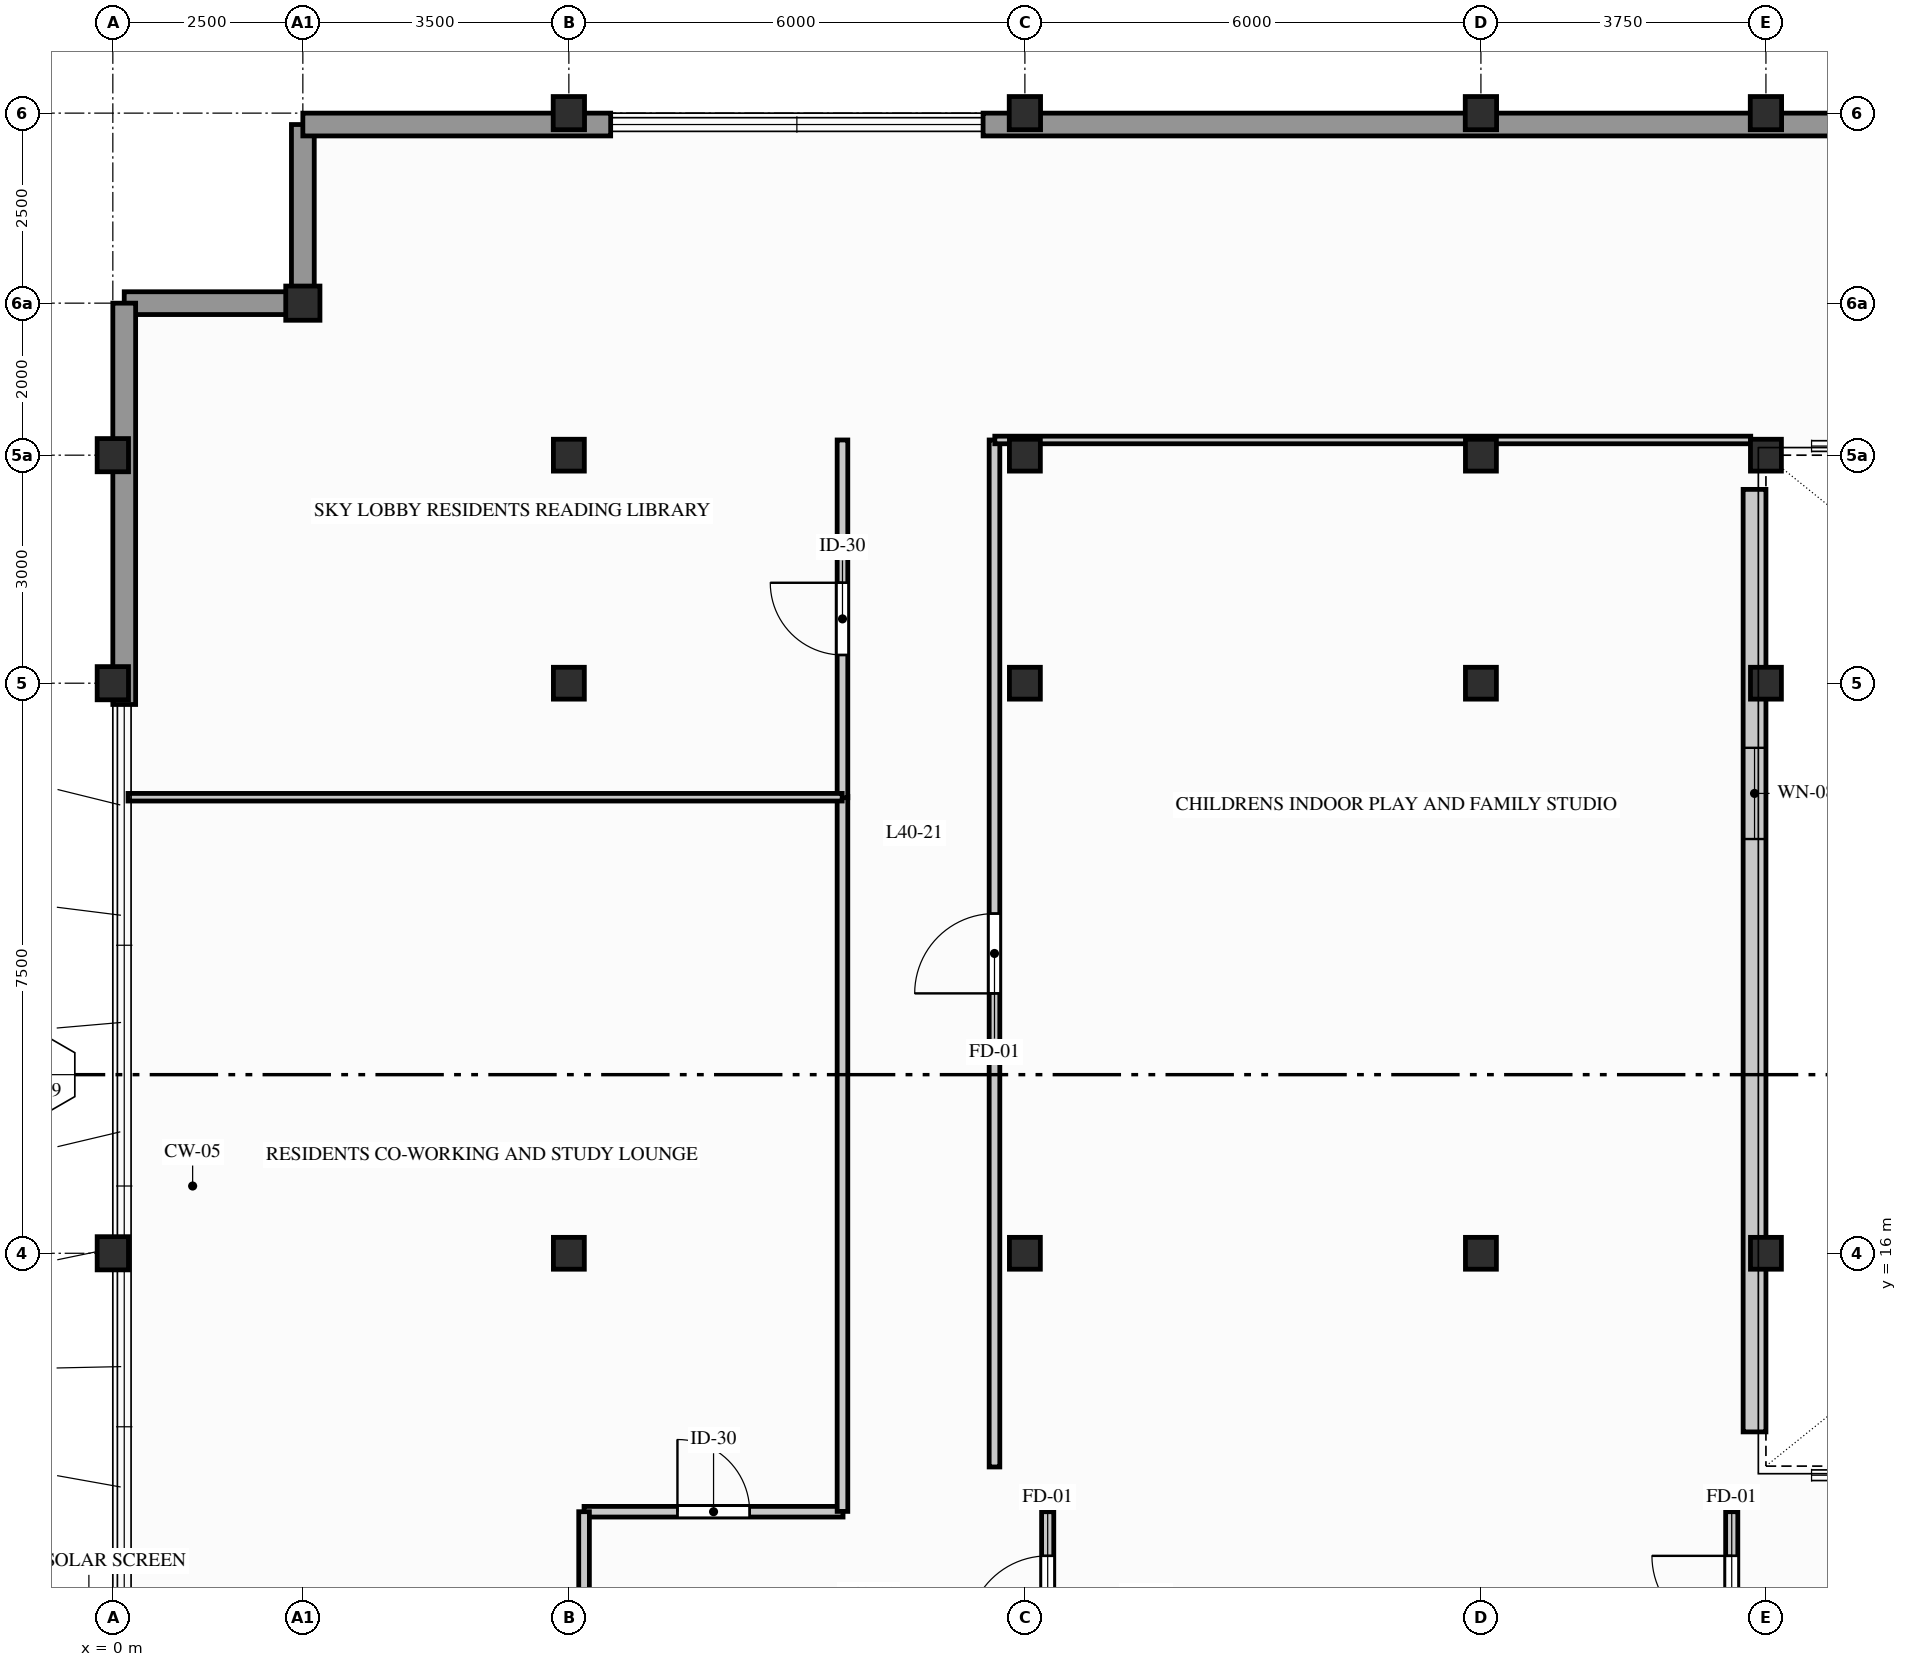
"""IFC4 building model, lengths in metres.
Left out: names, types, materials, properties, quantities, classifications, styles, units other than length and angle.
Written with IfcOpenShell. Run it as: python <this file> out.ifc"""

import sys

from ifc_helpers import new_model, si_unit, direction, frame, frame_2d, origin, origin_2d, place, context, subcontext, project, spatial, rectangle, hollow_rectangle, i_section, extrude, element, fill, save


model = new_model("IFC4")
c1 = context("Model", 3, precision=1e-05, world=origin(), true_north=direction((0.0, 1.0)))
c2 = subcontext(c1, "Body", "Model", "MODEL_VIEW")
j1 = project(units=[si_unit("LENGTHUNIT", "METRE"), si_unit("PLANEANGLEUNIT", "RADIAN")], contexts=[c1])
p1 = place(None, origin())
s1 = spatial("IfcSite", under=j1, at=p1, CompositionType="ELEMENT")
p2 = place(p1, origin())
s2 = spatial("IfcBuilding", under=s1, at=p2, CompositionType="ELEMENT")
p3 = place(p2, frame((0.0, 0.0, 134.5)))
s3 = spatial("IfcBuildingStorey", under=s2, at=p3, CompositionType="ELEMENT", Elevation=134.5)
for number, where, z_axis, x_axis in (
    (1, (0.0, 16.0, 0.0), (0.0, 0.0, 1.0), (1.0, 0.0, 0.0)),
    (2, (0.0, 23.5, 0.0), (0.0, 0.0, 1.0), (1.0, 0.0, 0.0)),
    (3, (0.0, 26.5, 0.0), (0.0, 0.0, 1.0), (1.0, 0.0, 0.0)),
):
    element("IfcColumn", number, at=place(p3, frame(where, z_axis=z_axis, x_axis=x_axis)), inside=s3, PredefinedType="COLUMN", context=c2, shape_type="SweptSolid", body=[
        extrude(i_section(OverallWidth=0.412, OverallDepth=0.437, WebThickness=0.036, FlangeThickness=0.058, FilletRadius=0.015, at=origin_2d()), origin(), (0.0, 0.0, 1.0), 4.2),
    ])
p4 = place(p3, frame((2.5, 28.5, 0.0), z_axis=(0.0, 0.0, 1.0), x_axis=(1.0, 0.0, 0.0)))
e4 = element("IfcColumn", 4, at=p4, inside=s3, PredefinedType="COLUMN", context=c2, shape_type="SweptSolid", body=[
    extrude(hollow_rectangle(XDim=0.45, YDim=0.45, WallThickness=0.025, InnerFilletRadius=0.012, OuterFilletRadius=0.024, at=origin_2d()), origin(), (0.0, 0.0, 1.0), 4.2),
])
for number, where, z_axis, x_axis in (
    (5, (6.0, 16.0, 0.0), (0.0, 0.0, 1.0), (1.0, 0.0, 0.0)),
    (6, (6.0, 23.5, 0.0), (0.0, 0.0, 1.0), (1.0, 0.0, 0.0)),
    (7, (6.0, 26.5, 0.0), (0.0, 0.0, 1.0), (1.0, 0.0, 0.0)),
):
    element("IfcColumn", number, at=place(p3, frame(where, z_axis=z_axis, x_axis=x_axis)), inside=s3, PredefinedType="COLUMN", context=c2, shape_type="SweptSolid", body=[
        extrude(i_section(OverallWidth=0.407, OverallDepth=0.419, WebThickness=0.031, FlangeThickness=0.049, FilletRadius=0.015, at=origin_2d()), origin(), (0.0, 0.0, 1.0), 4.2),
    ])
p5 = place(p3, frame((6.0, 31.0, 0.0), z_axis=(0.0, 0.0, 1.0), x_axis=(1.0, 0.0, 0.0)))
e8 = element("IfcColumn", 8, at=p5, inside=s3, PredefinedType="COLUMN", context=c2, shape_type="SweptSolid", body=[
    extrude(i_section(OverallWidth=0.412, OverallDepth=0.437, WebThickness=0.036, FlangeThickness=0.058, FilletRadius=0.015, at=origin_2d()), origin(), (0.0, 0.0, 1.0), 4.2),
])
for number, where, z_axis, x_axis in (
    (9, (12.0, 16.0, 0.0), (0.0, 0.0, 1.0), (1.0, 0.0, 0.0)),
    (10, (12.0, 23.5, 0.0), (0.0, 0.0, 1.0), (1.0, 0.0, 0.0)),
    (11, (12.0, 26.5, 0.0), (0.0, 0.0, 1.0), (1.0, 0.0, 0.0)),
):
    element("IfcColumn", number, at=place(p3, frame(where, z_axis=z_axis, x_axis=x_axis)), inside=s3, PredefinedType="COLUMN", context=c2, shape_type="SweptSolid", body=[
        extrude(i_section(OverallWidth=0.407, OverallDepth=0.419, WebThickness=0.031, FlangeThickness=0.049, FilletRadius=0.015, at=origin_2d()), origin(), (0.0, 0.0, 1.0), 4.2),
    ])
p6 = place(p3, frame((12.0, 31.0, 0.0), z_axis=(0.0, 0.0, 1.0), x_axis=(1.0, 0.0, 0.0)))
e12 = element("IfcColumn", 12, at=p6, inside=s3, PredefinedType="COLUMN", context=c2, shape_type="SweptSolid", body=[
    extrude(i_section(OverallWidth=0.412, OverallDepth=0.437, WebThickness=0.036, FlangeThickness=0.058, FilletRadius=0.015, at=origin_2d()), origin(), (0.0, 0.0, 1.0), 4.2),
])
for number, where, z_axis, x_axis in (
    (13, (18.0, 16.0, 0.0), (0.0, 0.0, 1.0), (1.0, 0.0, 0.0)),
    (14, (18.0, 23.5, 0.0), (0.0, 0.0, 1.0), (1.0, 0.0, 0.0)),
    (15, (18.0, 26.5, 0.0), (0.0, 0.0, 1.0), (1.0, 0.0, 0.0)),
):
    element("IfcColumn", number, at=place(p3, frame(where, z_axis=z_axis, x_axis=x_axis)), inside=s3, PredefinedType="COLUMN", context=c2, shape_type="SweptSolid", body=[
        extrude(i_section(OverallWidth=0.407, OverallDepth=0.419, WebThickness=0.031, FlangeThickness=0.049, FilletRadius=0.015, at=origin_2d()), origin(), (0.0, 0.0, 1.0), 4.2),
    ])
p7 = place(p3, frame((18.0, 31.0, 0.0), z_axis=(0.0, 0.0, 1.0), x_axis=(1.0, 0.0, 0.0)))
e16 = element("IfcColumn", 16, at=p7, inside=s3, PredefinedType="COLUMN", context=c2, shape_type="SweptSolid", body=[
    extrude(i_section(OverallWidth=0.412, OverallDepth=0.437, WebThickness=0.036, FlangeThickness=0.058, FilletRadius=0.015, at=origin_2d()), origin(), (0.0, 0.0, 1.0), 4.2),
])
for number, where, z_axis, x_axis in (
    (17, (21.75, 16.0, 0.0), (0.0, 0.0, 1.0), (1.0, 0.0, 0.0)),
    (18, (21.75, 23.5, 0.0), (0.0, 0.0, 1.0), (1.0, 0.0, 0.0)),
    (19, (21.75, 26.5, 0.0), (0.0, 0.0, 1.0), (1.0, 0.0, 0.0)),
):
    element("IfcColumn", number, at=place(p3, frame(where, z_axis=z_axis, x_axis=x_axis)), inside=s3, PredefinedType="COLUMN", context=c2, shape_type="SweptSolid", body=[
        extrude(i_section(OverallWidth=0.407, OverallDepth=0.419, WebThickness=0.031, FlangeThickness=0.049, FilletRadius=0.015, at=origin_2d()), origin(), (0.0, 0.0, 1.0), 4.2),
    ])
p8 = place(p3, frame((21.75, 31.0, 0.0), z_axis=(0.0, 0.0, 1.0), x_axis=(1.0, 0.0, 0.0)))
e20 = element("IfcColumn", 20, at=p8, inside=s3, PredefinedType="COLUMN", context=c2, shape_type="SweptSolid", body=[
    extrude(i_section(OverallWidth=0.412, OverallDepth=0.437, WebThickness=0.036, FlangeThickness=0.058, FilletRadius=0.015, at=origin_2d()), origin(), (0.0, 0.0, 1.0), 4.2),
])
for number, where, z_axis, x_axis in (
    (21, (2.5, 30.85, 0.0), (0.0, 0.0, 1.0), (0.0, -1.0, 0.0)),
    (22, (2.5, 28.5, 0.0), (0.0, 0.0, 1.0), (-1.0, 0.0, 0.0)),
):
    element("IfcWall", number, at=place(p3, frame(where, z_axis=z_axis, x_axis=x_axis)), inside=s3, PredefinedType="STANDARD", context=c2, shape_type="SweptSolid", body=[
        extrude(rectangle(XDim=2.35, YDim=0.3, at=frame_2d((1.175, 0.0))), origin(), (0.0, 0.0, 1.0), 3.98),
    ])
p9 = place(p3, frame((0.15, 28.5, 0.0), z_axis=(0.0, 0.0, 1.0), x_axis=(0.0, -1.0, 0.0)))
e23 = element("IfcWall", 23, at=p9, inside=s3, PredefinedType="STANDARD", context=c2, shape_type="SweptSolid", body=[
    extrude(rectangle(XDim=5.28, YDim=0.3, at=frame_2d((2.64, 0.0))), origin(), (0.0, 0.0, 1.0), 3.422),
])
p10 = place(p3, frame((2.5, 30.85, 0.0), z_axis=(0.0, 0.0, 1.0), x_axis=(1.0, 0.0, 0.0)))
e24 = element("IfcWall", 24, at=p10, inside=s3, PredefinedType="STANDARD", context=c2, shape_type="SweptSolid", body=[
    extrude(rectangle(XDim=4.05, YDim=0.3, at=frame_2d((2.025, 0.0))), origin(), (0.0, 0.0, 1.0), 3.98),
])
p11 = place(p3, frame((11.45, 30.85, 0.0), z_axis=(0.0, 0.0, 1.0), x_axis=(1.0, 0.0, 0.0)))
e25 = element("IfcWall", 25, at=p11, inside=s3, PredefinedType="STANDARD", context=c2, shape_type="SweptSolid", body=[
    extrude(rectangle(XDim=16.35, YDim=0.3, at=frame_2d((8.175, 0.0))), origin(), (0.0, 0.0, 1.0), 3.422),
])
p12 = place(p3, frame((21.6, 26.05, 0.0), z_axis=(0.0, 0.0, 1.0), x_axis=(0.0, -1.0, 0.0)))
e26 = element("IfcWall", 26, at=p12, inside=s3, PredefinedType="STANDARD", context=c2, shape_type="SweptSolid", body=[
    extrude(rectangle(XDim=12.4, YDim=0.3, at=frame_2d((6.2, 0.0))), origin(), (0.0, 0.0, 1.0), 3.343),
])
p13 = place(p12, frame((3.4, 0.0, 0.5)))
e27 = element("IfcOpeningElement", 27, at=p13, cuts=e26, PredefinedType="OPENING", context=c2, shape_type="SweptSolid", body=[
    extrude(rectangle(XDim=1.2, YDim=1.6, at=frame_2d((0.6, 0.8))), frame((0.0, 0.16, 0.0), z_axis=(0.0, -1.0, 0.0), x_axis=(1.0, 0.0, 0.0)), (0.0, 0.0, 1.0), 0.32),
])
p14 = place(p3, frame((12.3, 10.389, 0.0), z_axis=(0.0, 0.0, 1.0), x_axis=(0.0, 1.0, 0.0)))
e28 = element("IfcWall", 28, at=p14, inside=s3, PredefinedType="PARTITIONING", context=c2, shape_type="SweptSolid", body=[
    extrude(rectangle(XDim=2.211, YDim=0.16, at=frame_2d((1.106, 0.0))), origin(), (0.0, 0.0, 1.0), 3.98),
])
p15 = place(p14, frame((0.581, 0.0, 0.0)))
e29 = element("IfcOpeningElement", 29, at=p15, cuts=e28, PredefinedType="OPENING", context=c2, shape_type="SweptSolid", body=[
    extrude(rectangle(XDim=1.05, YDim=2.06, at=frame_2d((0.525, 1.03))), frame((0.0, 0.09, 0.0), z_axis=(0.0, -1.0, 0.0), x_axis=(1.0, 0.0, 0.0)), (0.0, 0.0, 1.0), 0.18),
])
p16 = place(p3, frame((21.3, 10.389, 0.0), z_axis=(0.0, 0.0, 1.0), x_axis=(0.0, 1.0, 0.0)))
e30 = element("IfcWall", 30, at=p16, inside=s3, PredefinedType="PARTITIONING", context=c2, shape_type="SweptSolid", body=[
    extrude(rectangle(XDim=2.211, YDim=0.16, at=frame_2d((1.106, 0.0))), origin(), (0.0, 0.0, 1.0), 3.98),
])
p17 = place(p16, frame((0.581, 0.0, 0.0)))
e31 = element("IfcOpeningElement", 31, at=p17, cuts=e30, PredefinedType="OPENING", context=c2, shape_type="SweptSolid", body=[
    extrude(rectangle(XDim=1.05, YDim=2.06, at=frame_2d((0.525, 1.03))), frame((0.0, 0.09, 0.0), z_axis=(0.0, -1.0, 0.0), x_axis=(1.0, 0.0, 0.0)), (0.0, 0.0, 1.0), 0.18),
])
p18 = place(p3, frame((6.2, 12.6, 0.0), z_axis=(0.0, 0.0, 1.0), x_axis=(1.0, 0.0, 0.0)))
e32 = element("IfcWall", 32, at=p18, inside=s3, PredefinedType="PARTITIONING", context=c2, shape_type="SweptSolid", body=[
    extrude(rectangle(XDim=3.407, YDim=0.14, at=frame_2d((1.704, 0.0))), origin(), (0.0, 0.0, 1.0), 3.98),
])
p19 = place(p18, frame((1.229, 0.0, 0.0)))
e33 = element("IfcOpeningElement", 33, at=p19, cuts=e32, PredefinedType="OPENING", context=c2, shape_type="SweptSolid", body=[
    extrude(rectangle(XDim=0.95, YDim=2.05, at=frame_2d((0.475, 1.025))), frame((0.0, 0.08, 0.0), z_axis=(0.0, -1.0, 0.0), x_axis=(1.0, 0.0, 0.0)), (0.0, 0.0, 1.0), 0.16),
])
p20 = place(p3, frame((6.2, 10.4, 0.0), z_axis=(0.0, 0.0, 1.0), x_axis=(0.0, 1.0, 0.0)))
e34 = element("IfcWall", 34, at=p20, inside=s3, PredefinedType="PARTITIONING", context=c2, shape_type="SweptSolid", body=[
    extrude(rectangle(XDim=2.2, YDim=0.14, at=frame_2d((1.1, 0.0))), origin(), (0.0, 0.0, 1.0), 3.343),
])
p21 = place(p3, frame((9.6, 12.604, 0.0), z_axis=(0.0, 0.0, 1.0), x_axis=(0.0, 1.0, 0.0)))
e35 = element("IfcWall", 35, at=p21, inside=s3, PredefinedType="PARTITIONING", context=c2, shape_type="SweptSolid", body=[
    extrude(rectangle(XDim=9.407, YDim=0.14, at=frame_2d((4.704, 0.0))), origin(), (0.0, 0.0, 1.0), 3.343),
])
p22 = place(p3, frame((9.6, 21.993, 0.0), z_axis=(0.0, 0.0, 1.0), x_axis=(0.0, 1.0, 0.0)))
e36 = element("IfcWall", 36, at=p22, inside=s3, PredefinedType="PARTITIONING", context=c2, shape_type="SweptSolid", body=[
    extrude(rectangle(XDim=4.707, YDim=0.14, at=frame_2d((2.354, 0.0))), origin(), (0.0, 0.0, 1.0), 3.343),
])
p23 = place(p22, frame((1.879, 0.0, 0.0)))
e37 = element("IfcOpeningElement", 37, at=p23, cuts=e36, PredefinedType="OPENING", context=c2, shape_type="SweptSolid", body=[
    extrude(rectangle(XDim=0.95, YDim=2.05, at=frame_2d((0.475, 1.025))), frame((0.0, 0.08, 0.0), z_axis=(0.0, -1.0, 0.0), x_axis=(1.0, 0.0, 0.0)), (0.0, 0.0, 1.0), 0.16),
])
p24 = place(p3, frame((11.6, 13.189, 0.0), z_axis=(0.0, 0.0, 1.0), x_axis=(0.0, 1.0, 0.0)))
e38 = element("IfcWall", 38, at=p24, inside=s3, PredefinedType="PARTITIONING", context=c2, shape_type="SweptSolid", body=[
    extrude(rectangle(XDim=13.511, YDim=0.14, at=frame_2d((6.756, 0.0))), origin(), (0.0, 0.0, 1.0), 3.343),
])
p25 = place(p24, frame((6.231, 0.0, 0.0)))
e39 = element("IfcOpeningElement", 39, at=p25, cuts=e38, PredefinedType="OPENING", context=c2, shape_type="SweptSolid", body=[
    extrude(rectangle(XDim=1.05, YDim=2.06, at=frame_2d((0.525, 1.03))), frame((0.0, 0.08, 0.0), z_axis=(0.0, -1.0, 0.0), x_axis=(1.0, 0.0, 0.0)), (0.0, 0.0, 1.0), 0.16),
])
p26 = place(p3, frame((0.2, 22.0, 0.0), z_axis=(0.0, 0.0, 1.0), x_axis=(1.0, 0.0, 0.0)))
e40 = element("IfcWall", 40, at=p26, inside=s3, PredefinedType="PARTITIONING", context=c2, shape_type="SweptSolid", body=[
    extrude(rectangle(XDim=9.396, YDim=0.1, at=frame_2d((4.698, 0.0))), origin(), (0.0, 0.0, 1.0), 3.343),
])
p27 = place(p3, frame((11.604, 26.7, 0.0), z_axis=(0.0, 0.0, 1.0), x_axis=(1.0, 0.0, 0.0)))
e41 = element("IfcWall", 41, at=p27, inside=s3, PredefinedType="PARTITIONING", context=c2, shape_type="SweptSolid", body=[
    extrude(rectangle(XDim=9.946, YDim=0.1, at=frame_2d((4.973, 0.0))), origin(), (0.0, 0.0, 1.0), 3.343),
])
p28 = place(p13, origin())
e42 = element("IfcWindow", 42, at=p28, inside=s3, PartitioningType="SINGLE_PANEL", PredefinedType="WINDOW", context=c2, shape_type="SweptSolid", body=[
    extrude(rectangle(XDim=1.2, YDim=1.6, at=frame_2d((0.6, 0.8))), frame((0.0, 0.03, 0.0), z_axis=(0.0, -1.0, 0.0), x_axis=(1.0, 0.0, 0.0)), (0.0, 0.0, 1.0), 0.06),
])
fill(e27, e42)
p29 = place(p15, origin())
e43 = element("IfcDoor", 43, at=p29, inside=s3, OperationType="SINGLE_SWING_LEFT", PredefinedType="DOOR", context=c2, shape_type="SweptSolid", body=[
    extrude(rectangle(XDim=1.05, YDim=2.06, at=frame_2d((0.525, 1.03))), frame((0.0, 0.025, 0.0), z_axis=(0.0, -1.0, 0.0), x_axis=(1.0, 0.0, 0.0)), (0.0, 0.0, 1.0), 0.05),
])
fill(e29, e43)
p30 = place(p17, origin())
e44 = element("IfcDoor", 44, at=p30, inside=s3, OperationType="SINGLE_SWING_RIGHT", PredefinedType="DOOR", context=c2, shape_type="SweptSolid", body=[
    extrude(rectangle(XDim=1.05, YDim=2.06, at=frame_2d((0.525, 1.03))), frame((0.0, 0.025, 0.0), z_axis=(0.0, -1.0, 0.0), x_axis=(1.0, 0.0, 0.0)), (0.0, 0.0, 1.0), 0.05),
])
fill(e31, e44)
p31 = place(p19, origin())
e45 = element("IfcDoor", 45, at=p31, inside=s3, OperationType="SINGLE_SWING_LEFT", PredefinedType="DOOR", context=c2, shape_type="SweptSolid", body=[
    extrude(rectangle(XDim=0.95, YDim=2.05, at=frame_2d((0.475, 1.025))), frame((0.0, 0.025, 0.0), z_axis=(0.0, -1.0, 0.0), x_axis=(1.0, 0.0, 0.0)), (0.0, 0.0, 1.0), 0.05),
])
fill(e33, e45)
p32 = place(p23, origin())
e46 = element("IfcDoor", 46, at=p32, inside=s3, OperationType="SINGLE_SWING_RIGHT", PredefinedType="DOOR", context=c2, shape_type="SweptSolid", body=[
    extrude(rectangle(XDim=0.95, YDim=2.05, at=frame_2d((0.475, 1.025))), frame((0.0, 0.025, 0.0), z_axis=(0.0, -1.0, 0.0), x_axis=(1.0, 0.0, 0.0)), (0.0, 0.0, 1.0), 0.05),
])
fill(e37, e46)
p33 = place(p25, origin())
e47 = element("IfcDoor", 47, at=p33, inside=s3, OperationType="SINGLE_SWING_LEFT", PredefinedType="DOOR", context=c2, shape_type="SweptSolid", body=[
    extrude(rectangle(XDim=1.05, YDim=2.06, at=frame_2d((0.525, 1.03))), frame((0.0, 0.025, 0.0), z_axis=(0.0, -1.0, 0.0), x_axis=(1.0, 0.0, 0.0)), (0.0, 0.0, 1.0), 0.05),
])
fill(e39, e47)
save(model, sys.argv[1])
